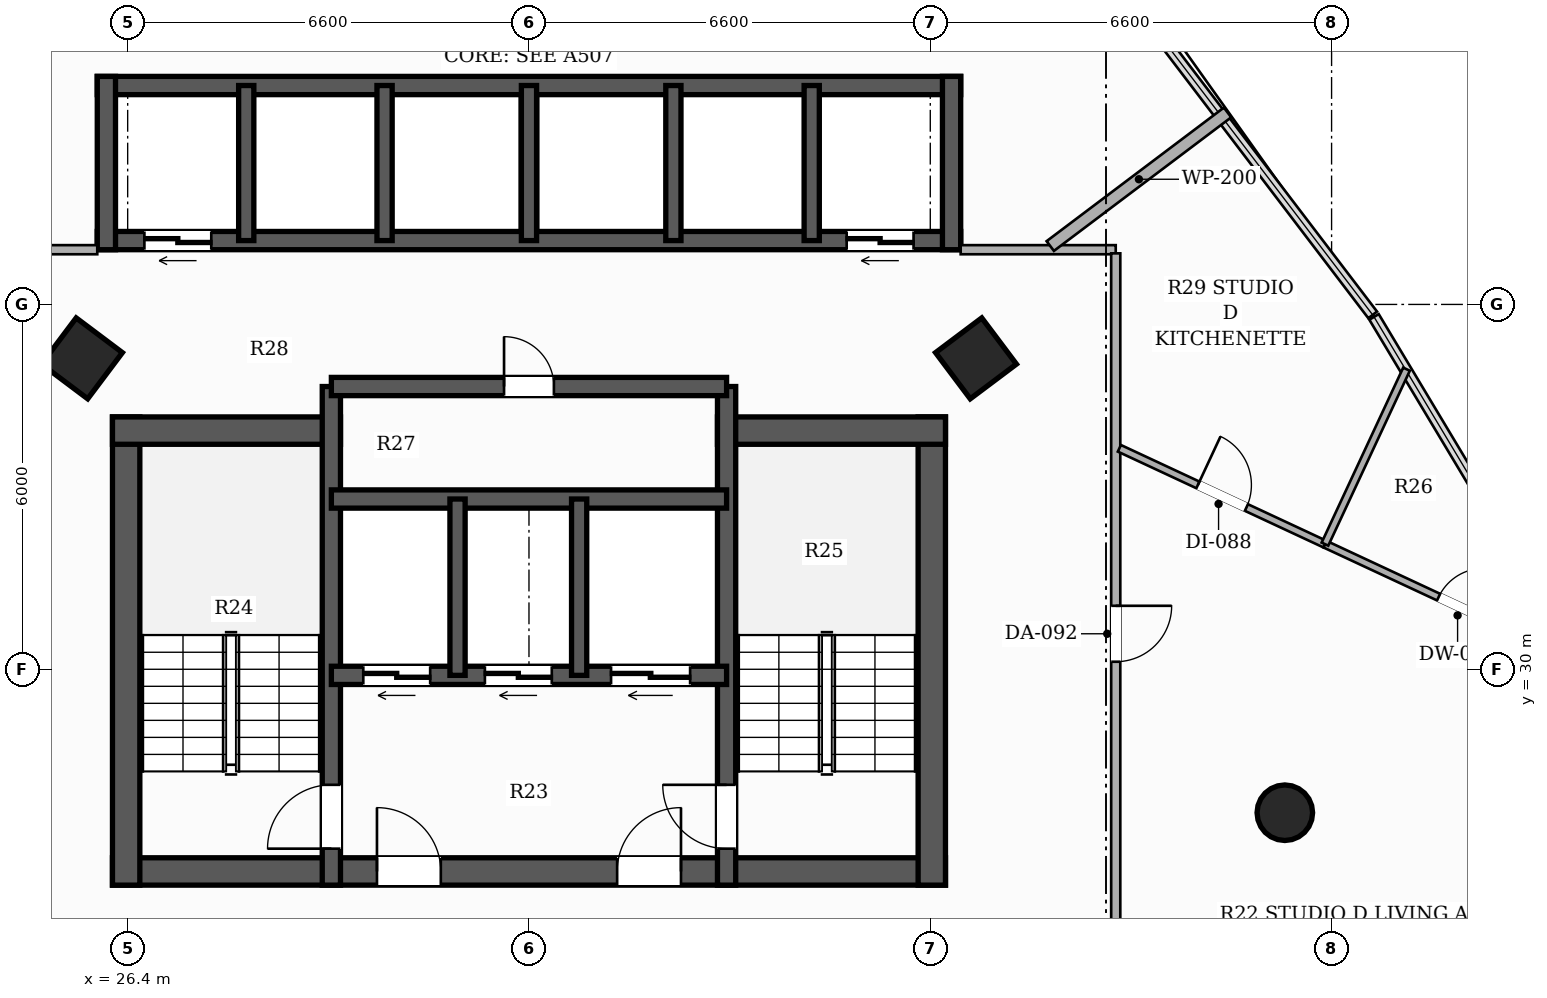
"""IFC4 building model, lengths in metres.
Left out: names, types, materials, properties, quantities, classifications, styles, units other than length and angle.
Written with IfcOpenShell. Run it as: python <this file> out.ifc"""

import sys

from ifc_helpers import new_model, si_unit, direction, frame, frame_2d, origin, origin_2d, place, context, subcontext, project, spatial, rectangle, hollow_rectangle, hollow_circle, extrude, element, fill, save


model = new_model("IFC4")
c1 = context("Model", 3, precision=1e-05, world=origin(), true_north=direction((0.0, 1.0)))
c2 = subcontext(c1, "Body", "Model", "MODEL_VIEW")
j1 = project(units=[si_unit("LENGTHUNIT", "METRE"), si_unit("PLANEANGLEUNIT", "RADIAN")], contexts=[c1])
p1 = place(None, origin())
s1 = spatial("IfcSite", under=j1, at=p1, CompositionType="ELEMENT")
p2 = place(p1, origin())
s2 = spatial("IfcBuilding", under=s1, at=p2, CompositionType="ELEMENT")
p3 = place(p2, frame((0.0, 0.0, 50.0)))
s3 = spatial("IfcBuildingStorey", under=s2, at=p3, CompositionType="ELEMENT", Elevation=50.0)
p4 = place(p3, frame((26.15, 26.675, 0.0), z_axis=(0.0, 0.0, 1.0), x_axis=(1.0, 0.0, 0.0)))
e1 = element("IfcWall", 1, at=p4, inside=s3, PredefinedType="SHEAR", context=c2, shape_type="SweptSolid", body=[
    extrude(rectangle(XDim=13.7, YDim=0.45, at=frame_2d((6.85, 0.0))), origin(), (0.0, 0.0, 1.0), 3.3),
])
p5 = place(p4, frame((4.35, 0.0, 0.0)))
e2 = element("IfcOpeningElement", 2, at=p5, cuts=e1, PredefinedType="OPENING", context=c2, shape_type="SweptSolid", body=[
    extrude(rectangle(XDim=1.05, YDim=2.15, at=frame_2d((0.525, 1.075))), frame((0.0, 0.235, 0.0), z_axis=(0.0, -1.0, 0.0), x_axis=(1.0, 0.0, 0.0)), (0.0, 0.0, 1.0), 0.47),
])
p6 = place(p4, frame((8.3, 0.0, 0.0)))
e3 = element("IfcOpeningElement", 3, at=p6, cuts=e1, PredefinedType="OPENING", context=c2, shape_type="SweptSolid", body=[
    extrude(rectangle(XDim=1.05, YDim=2.15, at=frame_2d((0.525, 1.075))), frame((0.0, 0.235, 0.0), z_axis=(0.0, -1.0, 0.0), x_axis=(1.0, 0.0, 0.0)), (0.0, 0.0, 1.0), 0.47),
])
p7 = place(p3, frame((26.375, 26.45, 0.0), z_axis=(0.0, 0.0, 1.0), x_axis=(0.0, 1.0, 0.0)))
e4 = element("IfcWall", 4, at=p7, inside=s3, PredefinedType="SHEAR", context=c2, shape_type="SweptSolid", body=[
    extrude(rectangle(XDim=7.7, YDim=0.45, at=frame_2d((3.85, 0.0))), origin(), (0.0, 0.0, 1.0), 3.3),
])
p8 = place(p3, frame((26.15, 33.925, 0.0), z_axis=(0.0, 0.0, 1.0), x_axis=(1.0, 0.0, 0.0)))
e5 = element("IfcWall", 5, at=p8, inside=s3, PredefinedType="SHEAR", context=c2, shape_type="SweptSolid", body=[
    extrude(rectangle(XDim=3.75, YDim=0.45, at=frame_2d((1.875, 0.0))), origin(), (0.0, 0.0, 1.0), 3.3),
])
p9 = place(p3, frame((39.625, 26.45, 0.0), z_axis=(0.0, 0.0, 1.0), x_axis=(0.0, 1.0, 0.0)))
e6 = element("IfcWall", 6, at=p9, inside=s3, PredefinedType="SHEAR", context=c2, shape_type="SweptSolid", body=[
    extrude(rectangle(XDim=7.7, YDim=0.45, at=frame_2d((3.85, 0.0))), origin(), (0.0, 0.0, 1.0), 3.3),
])
p10 = place(p3, frame((36.1, 33.925, 0.0), z_axis=(0.0, 0.0, 1.0), x_axis=(1.0, 0.0, 0.0)))
e7 = element("IfcWall", 7, at=p10, inside=s3, PredefinedType="SHEAR", context=c2, shape_type="SweptSolid", body=[
    extrude(rectangle(XDim=3.75, YDim=0.45, at=frame_2d((1.875, 0.0))), origin(), (0.0, 0.0, 1.0), 3.3),
])
p11 = place(p3, frame((29.75, 26.45, 0.0), z_axis=(0.0, 0.0, 1.0), x_axis=(0.0, 1.0, 0.0)))
e8 = element("IfcWall", 8, at=p11, inside=s3, PredefinedType="SHEAR", context=c2, shape_type="SweptSolid", body=[
    extrude(rectangle(XDim=8.2, YDim=0.3, at=frame_2d((4.1, 0.0))), origin(), (0.0, 0.0, 1.0), 3.3),
])
p12 = place(p11, frame((0.6, 0.0, 0.0)))
e9 = element("IfcOpeningElement", 9, at=p12, cuts=e8, PredefinedType="OPENING", context=c2, shape_type="SweptSolid", body=[
    extrude(rectangle(XDim=1.05, YDim=2.15, at=frame_2d((0.525, 1.075))), frame((0.0, 0.16, 0.0), z_axis=(0.0, -1.0, 0.0), x_axis=(1.0, 0.0, 0.0)), (0.0, 0.0, 1.0), 0.32),
])
p13 = place(p3, frame((36.25, 26.45, 0.0), z_axis=(0.0, 0.0, 1.0), x_axis=(0.0, 1.0, 0.0)))
e10 = element("IfcWall", 10, at=p13, inside=s3, PredefinedType="SHEAR", context=c2, shape_type="SweptSolid", body=[
    extrude(rectangle(XDim=8.2, YDim=0.3, at=frame_2d((4.1, 0.0))), origin(), (0.0, 0.0, 1.0), 3.3),
])
p14 = place(p13, frame((0.6, 0.0, 0.0)))
e11 = element("IfcOpeningElement", 11, at=p14, cuts=e10, PredefinedType="OPENING", context=c2, shape_type="SweptSolid", body=[
    extrude(rectangle(XDim=1.05, YDim=2.15, at=frame_2d((0.525, 1.075))), frame((0.0, 0.16, 0.0), z_axis=(0.0, -1.0, 0.0), x_axis=(1.0, 0.0, 0.0)), (0.0, 0.0, 1.0), 0.32),
])
p15 = place(p3, frame((36.25, 29.9, 0.0), z_axis=(0.0, 0.0, 1.0), x_axis=(-1.0, 0.0, 0.0)))
e12 = element("IfcWall", 12, at=p15, inside=s3, PredefinedType="SHEAR", context=c2, shape_type="SweptSolid", body=[
    extrude(rectangle(XDim=6.5, YDim=0.3, at=frame_2d((3.25, 0.0))), origin(), (0.0, 0.0, 1.0), 3.3),
])
p16 = place(p15, frame((4.875, 0.0, 0.0)))
e13 = element("IfcOpeningElement", 13, at=p16, cuts=e12, PredefinedType="OPENING", context=c2, shape_type="SweptSolid", body=[
    extrude(rectangle(XDim=1.1, YDim=2.2, at=frame_2d((0.55, 1.1))), frame((0.0, 0.16, 0.0), z_axis=(0.0, -1.0, 0.0), x_axis=(1.0, 0.0, 0.0)), (0.0, 0.0, 1.0), 0.32),
])
p17 = place(p15, frame((2.875, 0.0, 0.0)))
e14 = element("IfcOpeningElement", 14, at=p17, cuts=e12, PredefinedType="OPENING", context=c2, shape_type="SweptSolid", body=[
    extrude(rectangle(XDim=1.1, YDim=2.2, at=frame_2d((0.55, 1.1))), frame((0.0, 0.16, 0.0), z_axis=(0.0, -1.0, 0.0), x_axis=(1.0, 0.0, 0.0)), (0.0, 0.0, 1.0), 0.32),
])
p18 = place(p15, frame((0.6, 0.0, 0.0)))
e15 = element("IfcOpeningElement", 15, at=p18, cuts=e12, PredefinedType="OPENING", context=c2, shape_type="SweptSolid", body=[
    extrude(rectangle(XDim=1.3, YDim=2.2, at=frame_2d((0.65, 1.1))), frame((0.0, 0.16, 0.0), z_axis=(0.0, -1.0, 0.0), x_axis=(1.0, 0.0, 0.0)), (0.0, 0.0, 1.0), 0.32),
])
p19 = place(p3, frame((29.75, 32.8, 0.0), z_axis=(0.0, 0.0, 1.0), x_axis=(1.0, 0.0, 0.0)))
e16 = element("IfcWall", 16, at=p19, inside=s3, PredefinedType="SHEAR", context=c2, shape_type="SweptSolid", body=[
    extrude(rectangle(XDim=6.5, YDim=0.3, at=frame_2d((3.25, 0.0))), origin(), (0.0, 0.0, 1.0), 3.3),
])
for number, where, z_axis, x_axis in (
    (17, (31.825, 29.9, 0.0), (0.0, 0.0, 1.0), (0.0, 1.0, 0.0)),
    (18, (33.825, 29.9, 0.0), (0.0, 0.0, 1.0), (0.0, 1.0, 0.0)),
):
    element("IfcWall", number, at=place(p3, frame(where, z_axis=z_axis, x_axis=x_axis)), inside=s3, PredefinedType="SHEAR", context=c2, shape_type="SweptSolid", body=[
        extrude(rectangle(XDim=2.9, YDim=0.25, at=frame_2d((1.45, 0.0))), origin(), (0.0, 0.0, 1.0), 3.3),
    ])
p20 = place(p3, frame((29.75, 34.65, 0.0), z_axis=(0.0, 0.0, 1.0), x_axis=(1.0, 0.0, 0.0)))
e19 = element("IfcWall", 19, at=p20, inside=s3, PredefinedType="SHEAR", context=c2, shape_type="SweptSolid", body=[
    extrude(rectangle(XDim=6.5, YDim=0.3, at=frame_2d((3.25, 0.0))), origin(), (0.0, 0.0, 1.0), 3.3),
])
p21 = place(p20, frame((2.84, 0.0, 0.0)))
e20 = element("IfcOpeningElement", 20, at=p21, cuts=e19, PredefinedType="OPENING", context=c2, shape_type="SweptSolid", body=[
    extrude(rectangle(XDim=0.82, YDim=2.1, at=frame_2d((0.41, 1.05))), frame((0.0, 0.16, 0.0), z_axis=(0.0, -1.0, 0.0), x_axis=(1.0, 0.0, 0.0)), (0.0, 0.0, 1.0), 0.32),
])
p22 = place(p3, frame((40.1, 37.05, 0.0), z_axis=(0.0, 0.0, 1.0), x_axis=(-1.0, 0.0, 0.0)))
e21 = element("IfcWall", 21, at=p22, inside=s3, PredefinedType="SHEAR", context=c2, shape_type="SweptSolid", body=[
    extrude(rectangle(XDim=14.2, YDim=0.3, at=frame_2d((7.1, 0.0))), origin(), (0.0, 0.0, 1.0), 3.3),
])
p23 = place(p22, frame((12.325, 0.0, 0.0)))
e22 = element("IfcOpeningElement", 22, at=p23, cuts=e21, PredefinedType="OPENING", context=c2, shape_type="SweptSolid", body=[
    extrude(rectangle(XDim=1.1, YDim=2.2, at=frame_2d((0.55, 1.1))), frame((0.0, 0.16, 0.0), z_axis=(0.0, -1.0, 0.0), x_axis=(1.0, 0.0, 0.0)), (0.0, 0.0, 1.0), 0.32),
])
p24 = place(p22, frame((0.775, 0.0, 0.0)))
e23 = element("IfcOpeningElement", 23, at=p24, cuts=e21, PredefinedType="OPENING", context=c2, shape_type="SweptSolid", body=[
    extrude(rectangle(XDim=1.1, YDim=2.2, at=frame_2d((0.55, 1.1))), frame((0.0, 0.16, 0.0), z_axis=(0.0, -1.0, 0.0), x_axis=(1.0, 0.0, 0.0)), (0.0, 0.0, 1.0), 0.32),
])
p25 = place(p3, frame((25.9, 39.6, 0.0), z_axis=(0.0, 0.0, 1.0), x_axis=(1.0, 0.0, 0.0)))
e24 = element("IfcWall", 24, at=p25, inside=s3, PredefinedType="SHEAR", context=c2, shape_type="SweptSolid", body=[
    extrude(rectangle(XDim=14.2, YDim=0.3, at=frame_2d((7.1, 0.0))), origin(), (0.0, 0.0, 1.0), 3.3),
])
for number, where, z_axis, x_axis in (
    (25, (26.05, 36.9, 0.0), (0.0, 0.0, 1.0), (0.0, 1.0, 0.0)),
    (26, (39.95, 36.9, 0.0), (0.0, 0.0, 1.0), (0.0, 1.0, 0.0)),
):
    element("IfcWall", number, at=place(p3, frame(where, z_axis=z_axis, x_axis=x_axis)), inside=s3, PredefinedType="SHEAR", context=c2, shape_type="SweptSolid", body=[
        extrude(rectangle(XDim=2.85, YDim=0.3, at=frame_2d((1.425, 0.0))), origin(), (0.0, 0.0, 1.0), 3.3),
    ])
for number, where, z_axis, x_axis in (
    (27, (28.35, 37.05, 0.0), (0.0, 0.0, 1.0), (0.0, 1.0, 0.0)),
    (28, (30.625, 37.05, 0.0), (0.0, 0.0, 1.0), (0.0, 1.0, 0.0)),
    (29, (33.0, 37.05, 0.0), (0.0, 0.0, 1.0), (0.0, 1.0, 0.0)),
    (30, (35.375, 37.05, 0.0), (0.0, 0.0, 1.0), (0.0, 1.0, 0.0)),
    (31, (37.65, 37.05, 0.0), (0.0, 0.0, 1.0), (0.0, 1.0, 0.0)),
):
    element("IfcWall", number, at=place(p3, frame(where, z_axis=z_axis, x_axis=x_axis)), inside=s3, PredefinedType="SHEAR", context=c2, shape_type="SweptSolid", body=[
        extrude(rectangle(XDim=2.55, YDim=0.25, at=frame_2d((1.275, 0.0))), origin(), (0.0, 0.0, 1.0), 3.3),
    ])
p26 = place(p3, frame((25.648, 35.113, 0.0), z_axis=(0.0, 0.0, 1.0), x_axis=(0.600420225326, 0.799684658487, 0.0)))
e32 = element("IfcColumn", 32, at=p26, inside=s3, PredefinedType="COLUMN", context=c2, shape_type="SweptSolid", body=[
    extrude(hollow_rectangle(XDim=0.95, YDim=0.95, WallThickness=0.032, at=origin_2d()), origin(), (0.0, 0.0, 1.0), 3.3),
])
p27 = place(p3, frame((45.431, 27.641, 0.0), z_axis=(0.0, 0.0, 1.0), x_axis=(1.0, 0.0, 0.0)))
e33 = element("IfcColumn", 33, at=p27, inside=s3, PredefinedType="COLUMN", context=c2, shape_type="SweptSolid", body=[
    extrude(hollow_circle(Radius=0.457, WallThickness=0.025, at=origin_2d()), origin(), (0.0, 0.0, 1.0), 3.3),
])
p28 = place(p3, frame((40.352, 35.113, 0.0), z_axis=(0.0, 0.0, 1.0), x_axis=(-0.600420225326, 0.799684658487, 0.0)))
e34 = element("IfcColumn", 34, at=p28, inside=s3, PredefinedType="COLUMN", context=c2, shape_type="SweptSolid", body=[
    extrude(hollow_rectangle(XDim=0.95, YDim=0.95, WallThickness=0.032, at=origin_2d()), origin(), (0.0, 0.0, 1.0), 3.3),
])
p29 = place(p3, frame((40.1, 36.9, 0.0), z_axis=(0.0, 0.0, 1.0), x_axis=(1.0, 0.0, 0.0)))
e35 = element("IfcWall", 35, at=p29, inside=s3, PredefinedType="PARTITIONING", context=c2, shape_type="SweptSolid", body=[
    extrude(rectangle(XDim=2.55, YDim=0.15, at=frame_2d((1.275, 0.0))), origin(), (0.0, 0.0, 1.0), 2.413),
])
p30 = place(p3, frame((42.65, 36.84, 0.0), z_axis=(0.0, 0.0, 1.0), x_axis=(0.0, -1.0, 0.0)))
e36 = element("IfcWall", 36, at=p30, inside=s3, PredefinedType="PARTITIONING", context=c2, shape_type="SweptSolid", body=[
    extrude(rectangle(XDim=25.04, YDim=0.15, at=frame_2d((12.52, 0.0))), origin(), (0.0, 0.0, 1.0), 2.413),
])
p31 = place(p30, frame((16.466, 0.0, 0.0)))
e37 = element("IfcOpeningElement", 37, at=p31, cuts=e36, PredefinedType="OPENING", context=c2, shape_type="SweptSolid", body=[
    extrude(rectangle(XDim=0.92, YDim=2.15, at=frame_2d((0.46, 1.075))), frame((0.0, 0.085, 0.0), z_axis=(0.0, -1.0, 0.0), x_axis=(1.0, 0.0, 0.0)), (0.0, 0.0, 1.0), 0.17),
])
p32 = place(p30, frame((5.796, 0.0, 0.0)))
e38 = element("IfcOpeningElement", 38, at=p32, cuts=e36, PredefinedType="OPENING", context=c2, shape_type="SweptSolid", body=[
    extrude(rectangle(XDim=0.92, YDim=2.15, at=frame_2d((0.46, 1.075))), frame((0.0, 0.085, 0.0), z_axis=(0.0, -1.0, 0.0), x_axis=(1.0, 0.0, 0.0)), (0.0, 0.0, 1.0), 0.17),
])
p33 = place(p3, frame((23.41, 36.9, 0.0), z_axis=(0.0, 0.0, 1.0), x_axis=(1.0, 0.0, 0.0)))
e39 = element("IfcWall", 39, at=p33, inside=s3, PredefinedType="PARTITIONING", context=c2, shape_type="SweptSolid", body=[
    extrude(rectangle(XDim=2.49, YDim=0.15, at=frame_2d((1.245, 0.0))), origin(), (0.0, 0.0, 1.0), 2.413),
])
p34 = place(p3, frame((44.489, 39.157, 0.0), z_axis=(0.0, 0.0, 1.0), x_axis=(-0.798682095895, -0.601753196665, 0.0)))
e40 = element("IfcWall", 40, at=p34, inside=s3, PredefinedType="PARTITIONING", context=c2, shape_type="SweptSolid", body=[
    extrude(rectangle(XDim=3.651, YDim=0.2, at=frame_2d((1.826, 0.0))), origin(), (0.0, 0.0, 1.0), 3.06),
])
p35 = place(p3, frame((46.091, 32.058, 0.0), z_axis=(0.0, 0.0, 1.0), x_axis=(0.906338250566, -0.422552926343, 0.0)))
e41 = element("IfcWall", 41, at=p35, inside=s3, PredefinedType="PARTITIONING", context=c2, shape_type="SweptSolid", body=[
    extrude(rectangle(XDim=4.944, YDim=0.12, at=frame_2d((2.472, 0.0))), origin(), (0.0, 0.0, 1.0), 3.06),
])
p36 = place(p35, frame((2.062, 0.0, 0.0)))
e42 = element("IfcOpeningElement", 42, at=p36, cuts=e41, PredefinedType="OPENING", context=c2, shape_type="SweptSolid", body=[
    extrude(rectangle(XDim=0.82, YDim=2.1, at=frame_2d((0.41, 1.05))), frame((0.0, 0.07, 0.0), z_axis=(0.0, -1.0, 0.0), x_axis=(1.0, 0.0, 0.0)), (0.0, 0.0, 1.0), 0.14),
])
p37 = place(p3, frame((42.71, 33.634, 0.0), z_axis=(0.0, 0.0, 1.0), x_axis=(0.906380338854, -0.422462638985, 0.0)))
e43 = element("IfcWall", 43, at=p37, inside=s3, PredefinedType="PARTITIONING", context=c2, shape_type="SweptSolid", body=[
    extrude(rectangle(XDim=3.73, YDim=0.12, at=frame_2d((1.865, 0.0))), origin(), (0.0, 0.0, 1.0), 3.06),
])
p38 = place(p37, frame((1.425, 0.0, 0.0)))
e44 = element("IfcOpeningElement", 44, at=p38, cuts=e43, PredefinedType="OPENING", context=c2, shape_type="SweptSolid", body=[
    extrude(rectangle(XDim=0.88, YDim=2.1, at=frame_2d((0.44, 1.05))), frame((0.0, 0.07, 0.0), z_axis=(0.0, -1.0, 0.0), x_axis=(1.0, 0.0, 0.0)), (0.0, 0.0, 1.0), 0.14),
])
p39 = place(p3, frame((46.091, 32.058, 0.0), z_axis=(0.0, 0.0, 1.0), x_axis=(0.422430644664, 0.906395250677, 0.0)))
e45 = element("IfcWall", 45, at=p39, inside=s3, PredefinedType="PARTITIONING", context=c2, shape_type="SweptSolid", body=[
    extrude(rectangle(XDim=3.174, YDim=0.12, at=frame_2d((1.587, 0.0))), origin(), (0.0, 0.0, 1.0), 3.06),
])
p40 = place(p12, origin())
e46 = element("IfcDoor", 46, at=p40, inside=s3, OperationType="SINGLE_SWING_LEFT", PredefinedType="DOOR", context=c2, shape_type="SweptSolid", body=[
    extrude(rectangle(XDim=1.05, YDim=2.15, at=frame_2d((0.525, 1.075))), frame((0.0, 0.025, 0.0), z_axis=(0.0, -1.0, 0.0), x_axis=(1.0, 0.0, 0.0)), (0.0, 0.0, 1.0), 0.05),
])
fill(e9, e46)
p41 = place(p14, origin())
e47 = element("IfcDoor", 47, at=p41, inside=s3, OperationType="SINGLE_SWING_RIGHT", PredefinedType="DOOR", context=c2, shape_type="SweptSolid", body=[
    extrude(rectangle(XDim=1.05, YDim=2.15, at=frame_2d((0.525, 1.075))), frame((0.0, 0.025, 0.0), z_axis=(0.0, -1.0, 0.0), x_axis=(1.0, 0.0, 0.0)), (0.0, 0.0, 1.0), 0.05),
])
fill(e11, e47)
p42 = place(p5, origin())
e48 = element("IfcDoor", 48, at=p42, inside=s3, OperationType="SINGLE_SWING_LEFT", PredefinedType="DOOR", context=c2, shape_type="SweptSolid", body=[
    extrude(rectangle(XDim=1.05, YDim=2.15, at=frame_2d((0.525, 1.075))), frame((0.0, 0.025, 0.0), z_axis=(0.0, -1.0, 0.0), x_axis=(1.0, 0.0, 0.0)), (0.0, 0.0, 1.0), 0.05),
])
fill(e2, e48)
p43 = place(p6, origin())
e49 = element("IfcDoor", 49, at=p43, inside=s3, OperationType="SINGLE_SWING_RIGHT", PredefinedType="DOOR", context=c2, shape_type="SweptSolid", body=[
    extrude(rectangle(XDim=1.05, YDim=2.15, at=frame_2d((0.525, 1.075))), frame((0.0, 0.025, 0.0), z_axis=(0.0, -1.0, 0.0), x_axis=(1.0, 0.0, 0.0)), (0.0, 0.0, 1.0), 0.05),
])
fill(e3, e49)
p44 = place(p16, origin())
e50 = element("IfcDoor", 50, at=p44, inside=s3, OperationType="DOUBLE_DOOR_SLIDING", PredefinedType="DOOR", context=c2, shape_type="SweptSolid", body=[
    extrude(rectangle(XDim=1.1, YDim=2.2, at=frame_2d((0.55, 1.1))), frame((0.0, 0.025, 0.0), z_axis=(0.0, -1.0, 0.0), x_axis=(1.0, 0.0, 0.0)), (0.0, 0.0, 1.0), 0.05),
])
fill(e13, e50)
p45 = place(p17, origin())
e51 = element("IfcDoor", 51, at=p45, inside=s3, OperationType="DOUBLE_DOOR_SLIDING", PredefinedType="DOOR", context=c2, shape_type="SweptSolid", body=[
    extrude(rectangle(XDim=1.1, YDim=2.2, at=frame_2d((0.55, 1.1))), frame((0.0, 0.025, 0.0), z_axis=(0.0, -1.0, 0.0), x_axis=(1.0, 0.0, 0.0)), (0.0, 0.0, 1.0), 0.05),
])
fill(e14, e51)
p46 = place(p18, origin())
e52 = element("IfcDoor", 52, at=p46, inside=s3, OperationType="DOUBLE_DOOR_SLIDING", PredefinedType="DOOR", context=c2, shape_type="SweptSolid", body=[
    extrude(rectangle(XDim=1.3, YDim=2.2, at=frame_2d((0.65, 1.1))), frame((0.0, 0.025, 0.0), z_axis=(0.0, -1.0, 0.0), x_axis=(1.0, 0.0, 0.0)), (0.0, 0.0, 1.0), 0.05),
])
fill(e15, e52)
p47 = place(p23, origin())
e53 = element("IfcDoor", 53, at=p47, inside=s3, OperationType="DOUBLE_DOOR_SLIDING", PredefinedType="DOOR", context=c2, shape_type="SweptSolid", body=[
    extrude(rectangle(XDim=1.1, YDim=2.2, at=frame_2d((0.55, 1.1))), frame((0.0, 0.025, 0.0), z_axis=(0.0, -1.0, 0.0), x_axis=(1.0, 0.0, 0.0)), (0.0, 0.0, 1.0), 0.05),
])
fill(e22, e53)
p48 = place(p24, origin())
e54 = element("IfcDoor", 54, at=p48, inside=s3, OperationType="DOUBLE_DOOR_SLIDING", PredefinedType="DOOR", context=c2, shape_type="SweptSolid", body=[
    extrude(rectangle(XDim=1.1, YDim=2.2, at=frame_2d((0.55, 1.1))), frame((0.0, 0.025, 0.0), z_axis=(0.0, -1.0, 0.0), x_axis=(1.0, 0.0, 0.0)), (0.0, 0.0, 1.0), 0.05),
])
fill(e23, e54)
p49 = place(p21, origin())
e55 = element("IfcDoor", 55, at=p49, inside=s3, OperationType="SINGLE_SWING_LEFT", PredefinedType="DOOR", context=c2, shape_type="SweptSolid", body=[
    extrude(rectangle(XDim=0.82, YDim=2.1, at=frame_2d((0.41, 1.05))), frame((0.0, 0.025, 0.0), z_axis=(0.0, -1.0, 0.0), x_axis=(1.0, 0.0, 0.0)), (0.0, 0.0, 1.0), 0.05),
])
fill(e20, e55)
p50 = place(p32, origin())
e56 = element("IfcDoor", 56, at=p50, inside=s3, OperationType="SINGLE_SWING_LEFT", PredefinedType="DOOR", context=c2, shape_type="SweptSolid", body=[
    extrude(rectangle(XDim=0.92, YDim=2.15, at=frame_2d((0.46, 1.075))), frame((0.0, 0.025, 0.0), z_axis=(0.0, -1.0, 0.0), x_axis=(1.0, 0.0, 0.0)), (0.0, 0.0, 1.0), 0.05),
])
fill(e38, e56)
p51 = place(p36, origin())
e57 = element("IfcDoor", 57, at=p51, inside=s3, OperationType="SINGLE_SWING_RIGHT", PredefinedType="DOOR", context=c2, shape_type="SweptSolid", body=[
    extrude(rectangle(XDim=0.82, YDim=2.1, at=frame_2d((0.41, 1.05))), frame((0.0, 0.025, 0.0), z_axis=(0.0, -1.0, 0.0), x_axis=(1.0, 0.0, 0.0)), (0.0, 0.0, 1.0), 0.05),
])
fill(e42, e57)
p52 = place(p38, origin())
e58 = element("IfcDoor", 58, at=p52, inside=s3, OperationType="SINGLE_SWING_LEFT", PredefinedType="DOOR", context=c2, shape_type="SweptSolid", body=[
    extrude(rectangle(XDim=0.88, YDim=2.1, at=frame_2d((0.44, 1.05))), frame((0.0, 0.025, 0.0), z_axis=(0.0, -1.0, 0.0), x_axis=(1.0, 0.0, 0.0)), (0.0, 0.0, 1.0), 0.05),
])
fill(e44, e58)
save(model, sys.argv[1])
